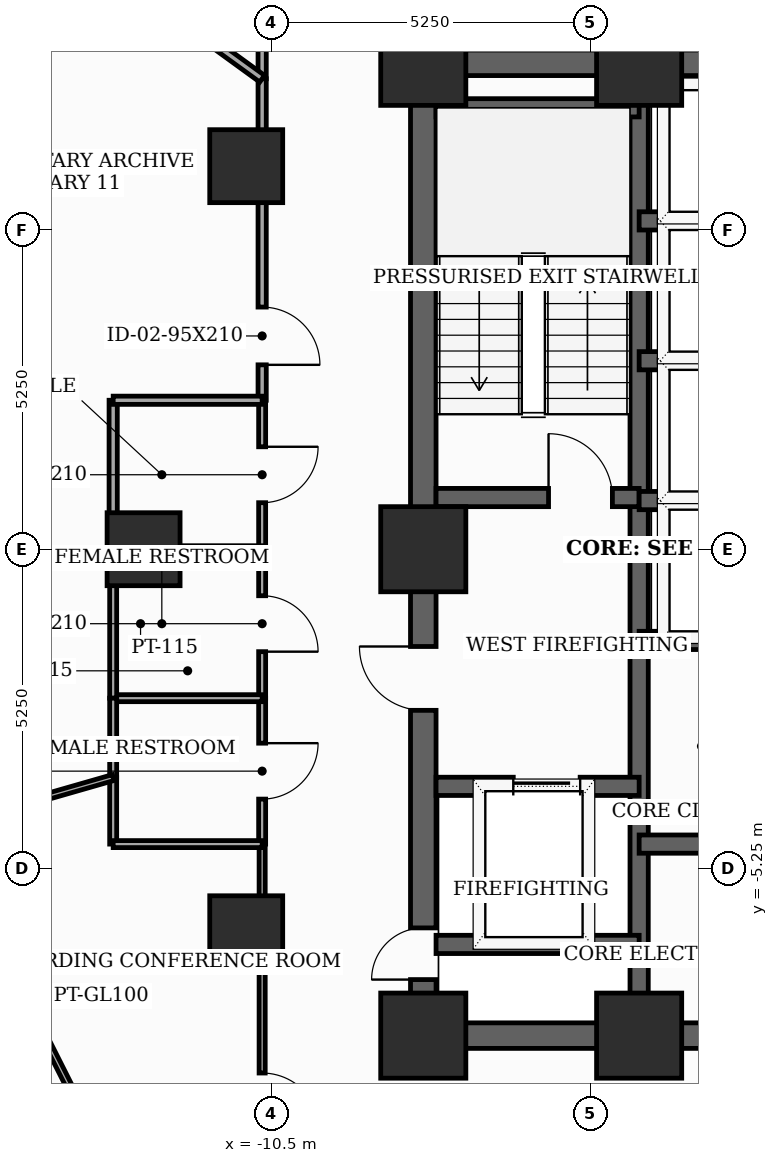
"""IFC4 building model, lengths in metres.
Left out: names, types, materials, properties, quantities, classifications, styles, units other than length and angle.
Written with IfcOpenShell. Run it as: python <this file> out.ifc"""

import sys

from ifc_helpers import new_model, si_unit, direction, frame, frame_2d, origin, origin_2d, place, context, subcontext, project, spatial, rectangle, extrude, element, fill, save


model = new_model("IFC4")
c1 = context("Model", 3, precision=1e-05, world=origin(), true_north=direction((0.0, 1.0)))
c2 = subcontext(c1, "Body", "Model", "MODEL_VIEW")
j1 = project(units=[si_unit("LENGTHUNIT", "METRE"), si_unit("PLANEANGLEUNIT", "RADIAN")], contexts=[c1])
p1 = place(None, origin())
s1 = spatial("IfcSite", under=j1, at=p1, CompositionType="ELEMENT")
p2 = place(p1, origin())
s2 = spatial("IfcBuilding", under=s1, at=p2, CompositionType="ELEMENT")
p3 = place(p2, frame((0.0, 0.0, 94.0)))
s3 = spatial("IfcBuildingStorey", under=s2, at=p3, CompositionType="ELEMENT", Elevation=94.0)
for number, where, z_axis, x_axis in (
    (1, (-8.0, -8.0, 0.0), (0.0, 0.0, 1.0), (1.0, 0.0, 0.0)),
    (2, (-4.45, -8.0, 0.0), (0.0, 0.0, 1.0), (1.0, 0.0, 0.0)),
    (3, (-4.45, 8.0, 0.0), (0.0, 0.0, 1.0), (1.0, 0.0, 0.0)),
    (4, (-8.0, 8.0, 0.0), (0.0, 0.0, 1.0), (1.0, 0.0, 0.0)),
    (5, (-8.0, 0.0, 0.0), (0.0, 0.0, 1.0), (1.0, 0.0, 0.0)),
):
    element("IfcColumn", number, at=place(p3, frame(where, z_axis=z_axis, x_axis=x_axis)), inside=s3, PredefinedType="COLUMN", context=c2, shape_type="SweptSolid", body=[
        extrude(rectangle(XDim=1.4, YDim=1.4, at=origin_2d()), origin(), (0.0, 0.0, 1.0), 3.7),
    ])
for number, where, z_axis, x_axis in (
    (6, (-10.912, 6.3, 0.0), (0.0, 0.0, 1.0), (1.0, 0.0, 0.0)),
    (7, (-12.6, 0.0, 0.0), (0.0, 0.0, 1.0), (1.0, 0.0, 0.0)),
    (8, (-10.912, -6.3, 0.0), (0.0, 0.0, 1.0), (1.0, 0.0, 0.0)),
):
    element("IfcColumn", number, at=place(p3, frame(where, z_axis=z_axis, x_axis=x_axis)), inside=s3, PredefinedType="COLUMN", context=c2, shape_type="SweptSolid", body=[
        extrude(rectangle(XDim=1.2, YDim=1.2, at=origin_2d()), origin(), (0.0, 0.0, 1.0), 3.7),
    ])
p4 = place(p3, frame((-8.0, -8.0, 0.0), z_axis=(0.0, 0.0, 1.0), x_axis=(0.0, 1.0, 0.0)))
e9 = element("IfcWall", 9, at=p4, inside=s3, PredefinedType="SHEAR", context=c2, shape_type="SweptSolid", body=[
    extrude(rectangle(XDim=16.0, YDim=0.42, at=frame_2d((8.0, 0.0))), origin(), (0.0, 0.0, 1.0), 3.5),
])
p5 = place(p4, frame((0.922, 0.0, 0.0)))
e10 = element("IfcOpeningElement", 10, at=p5, cuts=e9, PredefinedType="OPENING", context=c2, shape_type="SweptSolid", body=[
    extrude(rectangle(XDim=0.85, YDim=2.02, at=frame_2d((0.425, 1.01))), frame((0.0, 0.22, 0.0), z_axis=(0.0, -1.0, 0.0), x_axis=(1.0, 0.0, 0.0)), (0.0, 0.0, 1.0), 0.44),
])
p6 = place(p4, frame((5.35, 0.0, 0.0)))
e11 = element("IfcOpeningElement", 11, at=p6, cuts=e9, PredefinedType="OPENING", context=c2, shape_type="SweptSolid", body=[
    extrude(rectangle(XDim=1.05, YDim=2.15, at=frame_2d((0.525, 1.075))), frame((0.0, 0.22, 0.0), z_axis=(0.0, -1.0, 0.0), x_axis=(1.0, 0.0, 0.0)), (0.0, 0.0, 1.0), 0.44),
])
p7 = place(p3, frame((-8.0, -8.0, 0.0), z_axis=(0.0, 0.0, 1.0), x_axis=(1.0, 0.0, 0.0)))
e12 = element("IfcWall", 12, at=p7, inside=s3, PredefinedType="SHEAR", context=c2, shape_type="SweptSolid", body=[
    extrude(rectangle(XDim=16.0, YDim=0.42, at=frame_2d((8.0, 0.0))), origin(), (0.0, 0.0, 1.0), 3.5),
])
p8 = place(p7, frame((7.52, 0.0, 0.0)))
e13 = element("IfcOpeningElement", 13, at=p8, cuts=e12, PredefinedType="OPENING", context=c2, shape_type="SweptSolid", body=[
    extrude(rectangle(XDim=0.95, YDim=2.1, at=frame_2d((0.475, 1.05))), frame((0.0, 0.22, 0.0), z_axis=(0.0, -1.0, 0.0), x_axis=(1.0, 0.0, 0.0)), (0.0, 0.0, 1.0), 0.44),
])
p9 = place(p3, frame((-8.0, 8.0, 0.0), z_axis=(0.0, 0.0, 1.0), x_axis=(1.0, 0.0, 0.0)))
e14 = element("IfcWall", 14, at=p9, inside=s3, PredefinedType="SHEAR", context=c2, shape_type="SweptSolid", body=[
    extrude(rectangle(XDim=16.0, YDim=0.42, at=frame_2d((8.0, 0.0))), origin(), (0.0, 0.0, 1.0), 3.5),
])
p10 = place(p9, frame((7.1, 0.0, 0.0)))
e15 = element("IfcOpeningElement", 15, at=p10, cuts=e14, PredefinedType="OPENING", context=c2, shape_type="SweptSolid", body=[
    extrude(rectangle(XDim=1.8, YDim=2.15, at=frame_2d((0.9, 1.075))), frame((0.0, 0.22, 0.0), z_axis=(0.0, -1.0, 0.0), x_axis=(1.0, 0.0, 0.0)), (0.0, 0.0, 1.0), 0.44),
])
p11 = place(p3, frame((-4.45, -7.79, 0.0), z_axis=(0.0, 0.0, 1.0), x_axis=(0.0, 1.0, 0.0)))
e16 = element("IfcWall", 16, at=p11, inside=s3, PredefinedType="SHEAR", context=c2, shape_type="SweptSolid", body=[
    extrude(rectangle(XDim=15.58, YDim=0.3, at=frame_2d((7.79, 0.0))), origin(), (0.0, 0.0, 1.0), 3.5),
])
p12 = place(p3, frame((-7.79, 0.85, 0.0), z_axis=(0.0, 0.0, 1.0), x_axis=(1.0, 0.0, 0.0)))
e17 = element("IfcWall", 17, at=p12, inside=s3, PredefinedType="SHEAR", context=c2, shape_type="SweptSolid", body=[
    extrude(rectangle(XDim=3.34, YDim=0.3, at=frame_2d((1.67, 0.0))), origin(), (0.0, 0.0, 1.0), 3.5),
])
p13 = place(p12, frame((1.85, 0.0, 0.0)))
e18 = element("IfcOpeningElement", 18, at=p13, cuts=e17, PredefinedType="OPENING", context=c2, shape_type="SweptSolid", body=[
    extrude(rectangle(XDim=1.05, YDim=2.15, at=frame_2d((0.525, 1.075))), frame((0.0, 0.16, 0.0), z_axis=(0.0, -1.0, 0.0), x_axis=(1.0, 0.0, 0.0)), (0.0, 0.0, 1.0), 0.32),
])
p14 = place(p3, frame((-7.79, 7.26, 0.0), z_axis=(0.0, 0.0, 1.0), x_axis=(1.0, 0.0, 0.0)))
e19 = element("IfcWall", 19, at=p14, inside=s3, PredefinedType="SHEAR", context=c2, shape_type="SweptSolid", body=[
    extrude(rectangle(XDim=3.34, YDim=0.3, at=frame_2d((1.67, 0.0))), origin(), (0.0, 0.0, 1.0), 3.5),
])
p15 = place(p3, frame((-7.79, -3.9, 0.0), z_axis=(0.0, 0.0, 1.0), x_axis=(1.0, 0.0, 0.0)))
e20 = element("IfcWall", 20, at=p15, inside=s3, PredefinedType="SHEAR", context=c2, shape_type="SweptSolid", body=[
    extrude(rectangle(XDim=3.34, YDim=0.3, at=frame_2d((1.67, 0.0))), origin(), (0.0, 0.0, 1.0), 3.5),
])
p16 = place(p15, frame((1.27, 0.0, 0.0)))
e21 = element("IfcOpeningElement", 21, at=p16, cuts=e20, PredefinedType="OPENING", context=c2, shape_type="SweptSolid", body=[
    extrude(rectangle(XDim=1.1, YDim=2.1, at=frame_2d((0.55, 1.05))), frame((0.0, 0.16, 0.0), z_axis=(0.0, -1.0, 0.0), x_axis=(1.0, 0.0, 0.0)), (0.0, 0.0, 1.0), 0.32),
])
p17 = place(p3, frame((-7.79, -6.5, 0.0), z_axis=(0.0, 0.0, 1.0), x_axis=(1.0, 0.0, 0.0)))
e22 = element("IfcWall", 22, at=p17, inside=s3, PredefinedType="SHEAR", context=c2, shape_type="SweptSolid", body=[
    extrude(rectangle(XDim=3.34, YDim=0.3, at=frame_2d((1.67, 0.0))), origin(), (0.0, 0.0, 1.0), 3.5),
])
p18 = place(p3, frame((-4.45, -4.85, 0.0), z_axis=(0.0, 0.0, 1.0), x_axis=(1.0, 0.0, 0.0)))
e23 = element("IfcWall", 23, at=p18, inside=s3, PredefinedType="SHEAR", context=c2, shape_type="SweptSolid", body=[
    extrude(rectangle(XDim=8.9, YDim=0.3, at=frame_2d((4.45, 0.0))), origin(), (0.0, 0.0, 1.0), 3.5),
])
for number, where, z_axis, x_axis in (
    (24, (-4.45, -1.5, 0.0), (0.0, 0.0, 1.0), (1.0, 0.0, 0.0)),
    (25, (-4.45, 0.8, 0.0), (0.0, 0.0, 1.0), (1.0, 0.0, 0.0)),
    (26, (-4.45, 3.1, 0.0), (0.0, 0.0, 1.0), (1.0, 0.0, 0.0)),
    (27, (-4.45, 5.4, 0.0), (0.0, 0.0, 1.0), (1.0, 0.0, 0.0)),
):
    element("IfcWall", number, at=place(p3, frame(where, z_axis=z_axis, x_axis=x_axis)), inside=s3, PredefinedType="SHEAR", context=c2, shape_type="SweptSolid", body=[
        extrude(rectangle(XDim=2.77, YDim=0.3, at=frame_2d((1.385, 0.0))), origin(), (0.0, 0.0, 1.0), 3.5),
    ])
p19 = place(p3, frame((-10.65, 0.0, 0.0), z_axis=(0.0, 0.0, 1.0), x_axis=(0.0, -1.0, 0.0)))
e28 = element("IfcWall", 28, at=p19, inside=s3, PredefinedType="PARTITIONING", context=c2, shape_type="SweptSolid", body=[
    extrude(rectangle(XDim=2.45, YDim=0.115, at=frame_2d((1.225, 0.0))), origin(), (0.0, 0.0, 1.0), 2.785),
])
p20 = place(p19, frame((0.765, 0.0, 0.0)))
e29 = element("IfcOpeningElement", 29, at=p20, cuts=e28, PredefinedType="OPENING", context=c2, shape_type="SweptSolid", body=[
    extrude(rectangle(XDim=0.92, YDim=2.1, at=frame_2d((0.46, 1.05))), frame((0.0, 0.067, 0.0), z_axis=(0.0, -1.0, 0.0), x_axis=(1.0, 0.0, 0.0)), (0.0, 0.0, 1.0), 0.135),
])
p21 = place(p3, frame((-10.65, -2.45, 0.0), z_axis=(0.0, 0.0, 1.0), x_axis=(0.0, -1.0, 0.0)))
e30 = element("IfcWall", 30, at=p21, inside=s3, PredefinedType="PARTITIONING", context=c2, shape_type="SweptSolid", body=[
    extrude(rectangle(XDim=2.4, YDim=0.115, at=frame_2d((1.2, 0.0))), origin(), (0.0, 0.0, 1.0), 3.5),
])
p22 = place(p21, frame((0.74, 0.0, 0.0)))
e31 = element("IfcOpeningElement", 31, at=p22, cuts=e30, PredefinedType="OPENING", context=c2, shape_type="SweptSolid", body=[
    extrude(rectangle(XDim=0.92, YDim=2.1, at=frame_2d((0.46, 1.05))), frame((0.0, 0.067, 0.0), z_axis=(0.0, -1.0, 0.0), x_axis=(1.0, 0.0, 0.0)), (0.0, 0.0, 1.0), 0.135),
])
p23 = place(p3, frame((-10.65, -4.85, 0.0), z_axis=(0.0, 0.0, 1.0), x_axis=(0.0, -1.0, 0.0)))
e32 = element("IfcWall", 32, at=p23, inside=s3, PredefinedType="MOVABLE", context=c2, shape_type="SweptSolid", body=[
    extrude(rectangle(XDim=5.3, YDim=0.1, at=frame_2d((2.65, 0.0))), origin(), (0.0, 0.0, 1.0), 2.785),
])
p24 = place(p23, frame((3.765, 0.0, 0.0)))
e33 = element("IfcOpeningElement", 33, at=p24, cuts=e32, PredefinedType="OPENING", context=c2, shape_type="SweptSolid", body=[
    extrude(rectangle(XDim=0.95, YDim=2.1, at=frame_2d((0.475, 1.05))), frame((0.0, 0.06, 0.0), z_axis=(0.0, -1.0, 0.0), x_axis=(1.0, 0.0, 0.0)), (0.0, 0.0, 1.0), 0.12),
])
p25 = place(p3, frame((-10.65, 10.15, 0.0), z_axis=(0.0, 0.0, 1.0), x_axis=(0.0, -1.0, 0.0)))
e34 = element("IfcWall", 34, at=p25, inside=s3, PredefinedType="PARTITIONING", context=c2, shape_type="SweptSolid", body=[
    extrude(rectangle(XDim=2.412, YDim=0.135, at=frame_2d((1.206, 0.0))), origin(), (0.0, 0.0, 1.0), 3.5),
])
p26 = place(p25, frame((0.442, 0.0, 0.0)))
e35 = element("IfcOpeningElement", 35, at=p26, cuts=e34, PredefinedType="OPENING", context=c2, shape_type="SweptSolid", body=[
    extrude(rectangle(XDim=0.95, YDim=2.1, at=frame_2d((0.475, 1.05))), frame((0.0, 0.077, 0.0), z_axis=(0.0, -1.0, 0.0), x_axis=(1.0, 0.0, 0.0)), (0.0, 0.0, 1.0), 0.155),
])
p27 = place(p3, frame((-10.65, 7.738, 0.0), z_axis=(0.0, 0.0, 1.0), x_axis=(0.0, -1.0, 0.0)))
e36 = element("IfcWall", 36, at=p27, inside=s3, PredefinedType="PARTITIONING", context=c2, shape_type="SweptSolid", body=[
    extrude(rectangle(XDim=5.288, YDim=0.135, at=frame_2d((2.644, 0.0))), origin(), (0.0, 0.0, 1.0), 2.785),
])
p28 = place(p27, frame((3.755, 0.0, 0.0)))
e37 = element("IfcOpeningElement", 37, at=p28, cuts=e36, PredefinedType="OPENING", context=c2, shape_type="SweptSolid", body=[
    extrude(rectangle(XDim=0.95, YDim=2.1, at=frame_2d((0.475, 1.05))), frame((0.0, 0.077, 0.0), z_axis=(0.0, -1.0, 0.0), x_axis=(1.0, 0.0, 0.0)), (0.0, 0.0, 1.0), 0.155),
])
p29 = place(p3, frame((-10.65, 2.45, 0.0), z_axis=(0.0, 0.0, 1.0), x_axis=(0.0, -1.0, 0.0)))
e38 = element("IfcWall", 38, at=p29, inside=s3, PredefinedType="PARTITIONING", context=c2, shape_type="SweptSolid", body=[
    extrude(rectangle(XDim=2.45, YDim=0.115, at=frame_2d((1.225, 0.0))), origin(), (0.0, 0.0, 1.0), 2.785),
])
p30 = place(p29, frame((0.765, 0.0, 0.0)))
e39 = element("IfcOpeningElement", 39, at=p30, cuts=e38, PredefinedType="OPENING", context=c2, shape_type="SweptSolid", body=[
    extrude(rectangle(XDim=0.92, YDim=2.1, at=frame_2d((0.46, 1.05))), frame((0.0, 0.067, 0.0), z_axis=(0.0, -1.0, 0.0), x_axis=(1.0, 0.0, 0.0)), (0.0, 0.0, 1.0), 0.135),
])
p31 = place(p3, frame((-13.1, -2.45, 0.0), z_axis=(0.0, 0.0, 1.0), x_axis=(1.0, 0.0, 0.0)))
e40 = element("IfcWall", 40, at=p31, inside=s3, PredefinedType="PARTITIONING", context=c2, shape_type="SweptSolid", body=[
    extrude(rectangle(XDim=2.45, YDim=0.115, at=frame_2d((1.225, 0.0))), origin(), (0.0, 0.0, 1.0), 2.785),
])
p32 = place(p3, frame((-13.1, 0.0, 0.0), z_axis=(0.0, 0.0, 1.0), x_axis=(0.0, -1.0, 0.0)))
e41 = element("IfcWall", 41, at=p32, inside=s3, PredefinedType="PARTITIONING", context=c2, shape_type="SweptSolid", body=[
    extrude(rectangle(XDim=2.45, YDim=0.115, at=frame_2d((1.225, 0.0))), origin(), (0.0, 0.0, 1.0), 2.785),
])
p33 = place(p3, frame((-10.65, 0.0, 0.0), z_axis=(0.0, 0.0, 1.0), x_axis=(-1.0, 0.0, 0.0)))
e42 = element("IfcWall", 42, at=p33, inside=s3, PredefinedType="PARTITIONING", context=c2, shape_type="SweptSolid", body=[
    extrude(rectangle(XDim=2.45, YDim=0.115, at=frame_2d((1.225, 0.0))), origin(), (0.0, 0.0, 1.0), 2.785),
])
p34 = place(p3, frame((-13.1, -3.756, 0.0), z_axis=(0.0, 0.0, 1.0), x_axis=(0.0, -1.0, 0.0)))
e43 = element("IfcWall", 43, at=p34, inside=s3, PredefinedType="PARTITIONING", context=c2, shape_type="SweptSolid", body=[
    extrude(rectangle(XDim=1.094, YDim=0.115, at=frame_2d((0.547, 0.0))), origin(), (0.0, 0.0, 1.0), 3.5),
])
p35 = place(p3, frame((-13.1, -4.85, 0.0), z_axis=(0.0, 0.0, 1.0), x_axis=(1.0, 0.0, 0.0)))
e44 = element("IfcWall", 44, at=p35, inside=s3, PredefinedType="PARTITIONING", context=c2, shape_type="SweptSolid", body=[
    extrude(rectangle(XDim=2.45, YDim=0.115, at=frame_2d((1.225, 0.0))), origin(), (0.0, 0.0, 1.0), 2.785),
])
p36 = place(p3, frame((-13.1, -2.45, 0.0), z_axis=(0.0, 0.0, 1.0), x_axis=(0.0, -1.0, 0.0)))
e45 = element("IfcWall", 45, at=p36, inside=s3, PredefinedType="PARTITIONING", context=c2, shape_type="SweptSolid", body=[
    extrude(rectangle(XDim=1.306, YDim=0.115, at=frame_2d((0.653, 0.0))), origin(), (0.0, 0.0, 1.0), 3.5),
])
p37 = place(p3, frame((-15.968, -4.579, 0.0), z_axis=(0.0, 0.0, 1.0), x_axis=(0.450166439867, -0.892944665933, 0.0)))
e46 = element("IfcWall", 46, at=p37, inside=s3, PredefinedType="MOVABLE", context=c2, shape_type="SweptSolid", body=[
    extrude(rectangle(XDim=6.642, YDim=0.1, at=frame_2d((3.321, 0.0))), origin(), (0.0, 0.0, 1.0), 2.785),
])
p38 = place(p3, frame((-13.1, -3.756, 0.0), z_axis=(0.0, 0.0, 1.0), x_axis=(-0.961205264208, -0.275834080671, 0.0)))
e47 = element("IfcWall", 47, at=p38, inside=s3, PredefinedType="MOVABLE", context=c2, shape_type="SweptSolid", body=[
    extrude(rectangle(XDim=2.984, YDim=0.1, at=frame_2d((1.492, 0.0))), origin(), (0.0, 0.0, 1.0), 3.125),
])
p39 = place(p3, frame((-12.721, 9.242, 0.0), z_axis=(0.0, 0.0, 1.0), x_axis=(0.80916485127, -0.58758169089, 0.0)))
e48 = element("IfcWall", 48, at=p39, inside=s3, PredefinedType="PARTITIONING", context=c2, shape_type="SweptSolid", body=[
    extrude(rectangle(XDim=2.56, YDim=0.135, at=frame_2d((1.28, 0.0))), origin(), (0.0, 0.0, 1.0), 3.125),
])
p40 = place(p3, frame((-13.1, 0.0, 0.0), z_axis=(0.0, 0.0, 1.0), x_axis=(0.0, 1.0, 0.0)))
e49 = element("IfcWall", 49, at=p40, inside=s3, PredefinedType="PARTITIONING", context=c2, shape_type="SweptSolid", body=[
    extrude(rectangle(XDim=2.45, YDim=0.135, at=frame_2d((1.225, 0.0))), origin(), (0.0, 0.0, 1.0), 2.785),
])
p41 = place(p3, frame((-13.1, 2.45, 0.0), z_axis=(0.0, 0.0, 1.0), x_axis=(1.0, 0.0, 0.0)))
e50 = element("IfcWall", 50, at=p41, inside=s3, PredefinedType="PARTITIONING", context=c2, shape_type="SweptSolid", body=[
    extrude(rectangle(XDim=2.45, YDim=0.135, at=frame_2d((1.225, 0.0))), origin(), (0.0, 0.0, 1.0), 2.785),
])
p42 = place(p5, origin())
e51 = element("IfcDoor", 51, at=p42, inside=s3, OperationType="SINGLE_SWING_LEFT", PredefinedType="TRAPDOOR", context=c2, shape_type="SweptSolid", body=[
    extrude(rectangle(XDim=0.85, YDim=2.02, at=frame_2d((0.425, 1.01))), frame((0.0, 0.025, 0.0), z_axis=(0.0, -1.0, 0.0), x_axis=(1.0, 0.0, 0.0)), (0.0, 0.0, 1.0), 0.05),
])
fill(e10, e51)
p43 = place(p6, origin())
e52 = element("IfcDoor", 52, at=p43, inside=s3, OperationType="SINGLE_SWING_RIGHT", PredefinedType="DOOR", context=c2, shape_type="SweptSolid", body=[
    extrude(rectangle(XDim=1.05, YDim=2.15, at=frame_2d((0.525, 1.075))), frame((0.0, 0.025, 0.0), z_axis=(0.0, -1.0, 0.0), x_axis=(1.0, 0.0, 0.0)), (0.0, 0.0, 1.0), 0.05),
])
fill(e11, e52)
p44 = place(p13, origin())
e53 = element("IfcDoor", 53, at=p44, inside=s3, OperationType="SINGLE_SWING_LEFT", PredefinedType="DOOR", context=c2, shape_type="SweptSolid", body=[
    extrude(rectangle(XDim=1.05, YDim=2.15, at=frame_2d((0.525, 1.075))), frame((0.0, 0.025, 0.0), z_axis=(0.0, -1.0, 0.0), x_axis=(1.0, 0.0, 0.0)), (0.0, 0.0, 1.0), 0.05),
])
fill(e18, e53)
p45 = place(p16, origin())
e54 = element("IfcDoor", 54, at=p45, inside=s3, OperationType="SLIDING_TO_LEFT", PredefinedType="DOOR", context=c2, shape_type="SweptSolid", body=[
    extrude(rectangle(XDim=1.1, YDim=2.1, at=frame_2d((0.55, 1.05))), frame((0.0, 0.025, 0.0), z_axis=(0.0, -1.0, 0.0), x_axis=(1.0, 0.0, 0.0)), (0.0, 0.0, 1.0), 0.05),
])
fill(e21, e54)
p46 = place(p20, origin())
e55 = element("IfcDoor", 55, at=p46, inside=s3, OperationType="SINGLE_SWING_RIGHT", PredefinedType="DOOR", context=c2, shape_type="SweptSolid", body=[
    extrude(rectangle(XDim=0.92, YDim=2.1, at=frame_2d((0.46, 1.05))), frame((0.0, 0.025, 0.0), z_axis=(0.0, -1.0, 0.0), x_axis=(1.0, 0.0, 0.0)), (0.0, 0.0, 1.0), 0.05),
])
fill(e29, e55)
p47 = place(p22, origin())
e56 = element("IfcDoor", 56, at=p47, inside=s3, OperationType="SINGLE_SWING_LEFT", PredefinedType="DOOR", context=c2, shape_type="SweptSolid", body=[
    extrude(rectangle(XDim=0.92, YDim=2.1, at=frame_2d((0.46, 1.05))), frame((0.0, 0.025, 0.0), z_axis=(0.0, -1.0, 0.0), x_axis=(1.0, 0.0, 0.0)), (0.0, 0.0, 1.0), 0.05),
])
fill(e31, e56)
p48 = place(p24, origin())
e57 = element("IfcDoor", 57, at=p48, inside=s3, OperationType="SINGLE_SWING_RIGHT", PredefinedType="DOOR", context=c2, shape_type="SweptSolid", body=[
    extrude(rectangle(XDim=0.95, YDim=2.1, at=frame_2d((0.475, 1.05))), frame((0.0, 0.025, 0.0), z_axis=(0.0, -1.0, 0.0), x_axis=(1.0, 0.0, 0.0)), (0.0, 0.0, 1.0), 0.05),
])
fill(e33, e57)
p49 = place(p28, origin())
e58 = element("IfcDoor", 58, at=p49, inside=s3, OperationType="SINGLE_SWING_RIGHT", PredefinedType="DOOR", context=c2, shape_type="SweptSolid", body=[
    extrude(rectangle(XDim=0.95, YDim=2.1, at=frame_2d((0.475, 1.05))), frame((0.0, 0.025, 0.0), z_axis=(0.0, -1.0, 0.0), x_axis=(1.0, 0.0, 0.0)), (0.0, 0.0, 1.0), 0.05),
])
fill(e37, e58)
p50 = place(p30, origin())
e59 = element("IfcDoor", 59, at=p50, inside=s3, OperationType="SINGLE_SWING_LEFT", PredefinedType="DOOR", context=c2, shape_type="SweptSolid", body=[
    extrude(rectangle(XDim=0.92, YDim=2.1, at=frame_2d((0.46, 1.05))), frame((0.0, 0.025, 0.0), z_axis=(0.0, -1.0, 0.0), x_axis=(1.0, 0.0, 0.0)), (0.0, 0.0, 1.0), 0.05),
])
fill(e39, e59)
save(model, sys.argv[1])
